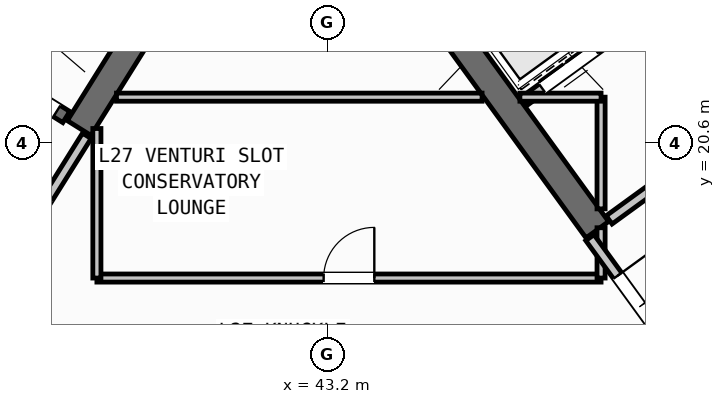
"""IFC4 building model, lengths in metres.
Left out: names, types, materials, properties, quantities, classifications, styles, units other than length and angle.
Written with IfcOpenShell. Run it as: python <this file> out.ifc"""

import sys

from ifc_helpers import new_model, si_unit, direction, frame, frame_2d, origin, place, context, subcontext, project, spatial, rectangle, extrude, source, transform, mapped, element, fill, save


model = new_model("IFC4")
c1 = context("Model", 3, precision=1e-05, world=origin(), true_north=direction((0.0, 1.0)))
c2 = subcontext(c1, "Body", "Model", "MODEL_VIEW")
j1 = project(units=[si_unit("LENGTHUNIT", "METRE"), si_unit("PLANEANGLEUNIT", "RADIAN")], contexts=[c1])
p1 = place(None, origin())
s1 = spatial("IfcSite", under=j1, at=p1, CompositionType="ELEMENT")
p2 = place(p1, origin())
s2 = spatial("IfcBuilding", under=s1, at=p2, CompositionType="ELEMENT")
p3 = place(p2, frame((0.0, 0.0, 108.9)))
s3 = spatial("IfcBuildingStorey", under=s2, at=p3, CompositionType="ELEMENT", Elevation=108.9)
p4 = place(p3, frame((40.194, 23.922, 0.0), z_axis=(0.0, 0.0, 1.0), x_axis=(-0.529888438328, -0.848067357541, 0.0)))
e1 = element("IfcWall", 1, at=p4, inside=s3, PredefinedType="SHEAR", context=c2, shape_type="SweptSolid", body=[
    extrude(rectangle(XDim=3.575, YDim=0.55, at=frame_2d((1.788, 0.0))), origin(), (0.0, 0.0, 1.0), 3.35),
])
p5 = place(p3, frame((48.526, 18.884, 0.0), z_axis=(0.0, 0.0, 1.0), x_axis=(-0.587764933797, 0.809031756236, 0.0)))
e2 = element("IfcWall", 2, at=p5, inside=s3, PredefinedType="SHEAR", context=c2, shape_type="SweptSolid", body=[
    extrude(rectangle(XDim=6.425, YDim=0.55, at=frame_2d((3.212, 0.0))), origin(), (0.0, 0.0, 1.0), 3.35),
])
p6 = place(p3, frame((38.046, 21.108, 0.0), z_axis=(0.0, 0.0, 1.0), x_axis=(-0.848054434086, 0.529909121291, 0.0)))
e3 = element("IfcWall", 3, at=p6, inside=s3, PredefinedType="SHEAR", context=c2, shape_type="SweptSolid", body=[
    extrude(rectangle(XDim=7.33, YDim=0.26, at=frame_2d((3.665, 0.0))), origin(), (0.0, 0.0, 1.0), 3.35),
])
p7 = place(p6, frame((0.22, 0.0, 0.0)))
e4 = element("IfcOpeningElement", 4, at=p7, cuts=e3, PredefinedType="OPENING", context=c2, shape_type="SweptSolid", body=[
    extrude(rectangle(XDim=1.1, YDim=2.1, at=frame_2d((0.55, 1.05))), frame((0.0, 0.14, 0.0), z_axis=(0.0, -1.0, 0.0), x_axis=(1.0, 0.0, 0.0)), (0.0, 0.0, 1.0), 0.28),
])
p8 = place(p3, frame((47.065, 21.407, 0.0), z_axis=(0.0, 0.0, 1.0), x_axis=(0.809032984992, 0.587763242466, 0.0)))
e5 = element("IfcWall", 5, at=p8, inside=s3, PredefinedType="STANDARD", context=c2, shape_type="SweptSolid", body=[
    extrude(rectangle(XDim=3.448, YDim=0.2, at=frame_2d((1.724, 0.0))), origin(), (0.0, 0.0, 1.0), 3.34),
])
p9 = place(p8, frame((0.458, 0.0, 0.0)))
e6 = element("IfcOpeningElement", 6, at=p9, cuts=e5, PredefinedType="OPENING", context=c2, shape_type="SweptSolid", body=[
    extrude(rectangle(XDim=1.3, YDim=2.2, at=frame_2d((0.65, 1.1))), frame((0.0, 0.11, 0.0), z_axis=(0.0, -1.0, 0.0), x_axis=(1.0, 0.0, 0.0)), (0.0, 0.0, 1.0), 0.22),
])
p10 = place(p3, frame((48.758, 19.077, 0.0), z_axis=(0.0, 0.0, 1.0), x_axis=(0.809005065155, 0.587801671104, 0.0)))
e7 = element("IfcWall", 7, at=p10, inside=s3, PredefinedType="STANDARD", context=c2, shape_type="SweptSolid", body=[
    extrude(rectangle(XDim=5.768, YDim=0.2, at=frame_2d((2.884, 0.0))), origin(), (0.0, 0.0, 1.0), 3.34),
])
p11 = place(p10, frame((2.548, 0.0, 0.0)))
e8 = element("IfcOpeningElement", 8, at=p11, cuts=e7, PredefinedType="OPENING", context=c2, shape_type="SweptSolid", body=[
    extrude(rectangle(XDim=1.15, YDim=2.1, at=frame_2d((0.575, 1.05))), frame((0.0, 0.11, 0.0), z_axis=(0.0, -1.0, 0.0), x_axis=(1.0, 0.0, 0.0)), (0.0, 0.0, 1.0), 0.22),
])
p12 = place(p3, frame((38.451, 20.737, 0.0), z_axis=(0.0, 0.0, 1.0), x_axis=(-0.529924799939, -0.848044637038, 0.0)))
e9 = element("IfcWall", 9, at=p12, inside=s3, PredefinedType="STANDARD", context=c2, shape_type="SweptSolid", body=[
    extrude(rectangle(XDim=2.96, YDim=0.2, at=frame_2d((1.48, 0.0))), origin(), (0.0, 0.0, 1.0), 3.34),
])
p13 = place(p12, frame((1.46, 0.0, 0.0)))
e10 = element("IfcOpeningElement", 10, at=p13, cuts=e9, PredefinedType="OPENING", context=c2, shape_type="SweptSolid", body=[
    extrude(rectangle(XDim=0.86, YDim=2.05, at=frame_2d((0.43, 1.025))), frame((0.0, 0.11, 0.0), z_axis=(0.0, -1.0, 0.0), x_axis=(1.0, 0.0, 0.0)), (0.0, 0.0, 1.0), 0.22),
])
p14 = place(p3, frame((38.65, 17.93, 0.0), z_axis=(0.0, 0.0, 1.0), x_axis=(1.0, 0.0, 0.0)))
e11 = element("IfcWall", 11, at=p14, inside=s3, PredefinedType="PARTITIONING", context=c2, shape_type="SweptSolid", body=[
    extrude(rectangle(XDim=9.95, YDim=0.16, at=frame_2d((4.975, 0.0))), origin(), (0.0, 0.0, 1.0), 3.34),
])
p15 = place(p14, frame((4.475, 0.0, 0.0)))
e12 = element("IfcOpeningElement", 12, at=p15, cuts=e11, PredefinedType="OPENING", context=c2, shape_type="SweptSolid", body=[
    extrude(rectangle(XDim=1.0, YDim=2.1, at=frame_2d((0.5, 1.05))), frame((0.0, 0.09, 0.0), z_axis=(0.0, -1.0, 0.0), x_axis=(1.0, 0.0, 0.0)), (0.0, 0.0, 1.0), 0.18),
])
p16 = place(p3, frame((38.65, 17.93, 0.0), z_axis=(0.0, 0.0, 1.0), x_axis=(0.0, 1.0, 0.0)))
e13 = element("IfcWall", 13, at=p16, inside=s3, PredefinedType="PARTITIONING", context=c2, shape_type="SweptSolid", body=[
    extrude(rectangle(XDim=2.951, YDim=0.16, at=frame_2d((1.476, 0.0))), origin(), (0.0, 0.0, 1.0), 3.34),
])
p17 = place(p3, frame((48.6, 17.93, 0.0), z_axis=(0.0, 0.0, 1.0), x_axis=(0.0, 1.0, 0.0)))
e14 = element("IfcWall", 14, at=p17, inside=s3, PredefinedType="PARTITIONING", context=c2, shape_type="SweptSolid", body=[
    extrude(rectangle(XDim=0.993, YDim=0.16, at=frame_2d((0.496, 0.0))), origin(), (0.0, 0.0, 1.0), 3.34),
])
p18 = place(p3, frame((48.6, 19.295, 0.0), z_axis=(0.0, 0.0, 1.0), x_axis=(0.0, 1.0, 0.0)))
e15 = element("IfcWall", 15, at=p18, inside=s3, PredefinedType="PARTITIONING", context=c2, shape_type="SweptSolid", body=[
    extrude(rectangle(XDim=2.205, YDim=0.16, at=frame_2d((1.103, 0.0))), origin(), (0.0, 0.0, 1.0), 3.34),
])
p19 = place(p3, frame((39.037, 21.5, 0.0), z_axis=(0.0, 0.0, 1.0), x_axis=(1.0, 0.0, 0.0)))
e16 = element("IfcWall", 16, at=p19, inside=s3, PredefinedType="PARTITIONING", context=c2, shape_type="SweptSolid", body=[
    extrude(rectangle(XDim=7.215, YDim=0.16, at=frame_2d((3.607, 0.0))), origin(), (0.0, 0.0, 1.0), 3.34),
])
p20 = place(p3, frame((46.998, 21.5, 0.0), z_axis=(0.0, 0.0, 1.0), x_axis=(1.0, 0.0, 0.0)))
e17 = element("IfcWall", 17, at=p20, inside=s3, PredefinedType="PARTITIONING", context=c2, shape_type="SweptSolid", body=[
    extrude(rectangle(XDim=1.602, YDim=0.16, at=frame_2d((0.801, 0.0))), origin(), (0.0, 0.0, 1.0), 3.34),
])
p21 = place(p3, frame((50.119, 16.333, 0.0), z_axis=(0.0, 0.0, 1.0), x_axis=(-0.587749856981, 0.809042709391, 0.0)))
e18 = element("IfcWall", 18, at=p21, inside=s3, PredefinedType="STANDARD", context=c2, shape_type="SweptSolid", body=[
    extrude(rectangle(XDim=2.96, YDim=0.2, at=frame_2d((1.48, 0.0))), origin(), (0.0, 0.0, 1.0), 3.34),
])
p22 = place(p21, frame((0.53, 0.0, 0.0)))
e19 = element("IfcOpeningElement", 19, at=p22, cuts=e18, PredefinedType="OPENING", context=c2, shape_type="SweptSolid", body=[
    extrude(rectangle(XDim=1.5, YDim=2.15, at=frame_2d((0.75, 1.075))), frame((0.0, 0.11, 0.0), z_axis=(0.0, -1.0, 0.0), x_axis=(1.0, 0.0, 0.0)), (0.0, 0.0, 1.0), 0.22),
])
m1 = source(origin(), c2, "Body", "SweptSolid", [
    extrude(rectangle(XDim=1.1, YDim=2.1, at=frame_2d((0.55, 1.05))), frame((0.0, 0.025, 0.0), z_axis=(0.0, -1.0, 0.0), x_axis=(1.0, 0.0, 0.0)), (0.0, 0.0, 1.0), 0.05),
])
p23 = place(p7, origin())
e20 = element("IfcDoor", 20, at=p23, inside=s3, OperationType="SINGLE_SWING_RIGHT", PredefinedType="DOOR", context=c2, shape_type="MappedRepresentation", body=[
    mapped(m1, transform((0.0, 0.0, 0.0), scale=1.0)),
])
fill(e4, e20)
m2 = source(origin(), c2, "Body", "SweptSolid", [
    extrude(rectangle(XDim=1.3, YDim=2.2, at=frame_2d((0.65, 1.1))), frame((0.0, 0.025, 0.0), z_axis=(0.0, -1.0, 0.0), x_axis=(1.0, 0.0, 0.0)), (0.0, 0.0, 1.0), 0.05),
])
p24 = place(p9, origin())
e21 = element("IfcDoor", 21, at=p24, inside=s3, OperationType="DOUBLE_DOOR_SLIDING", PredefinedType="DOOR", context=c2, shape_type="MappedRepresentation", body=[
    mapped(m2, transform((0.0, 0.0, 0.0), scale=1.0)),
])
fill(e6, e21)
m3 = source(origin(), c2, "Body", "SweptSolid", [
    extrude(rectangle(XDim=1.0, YDim=2.1, at=frame_2d((0.5, 1.05))), frame((0.0, 0.025, 0.0), z_axis=(0.0, -1.0, 0.0), x_axis=(1.0, 0.0, 0.0)), (0.0, 0.0, 1.0), 0.05),
])
p25 = place(p15, origin())
e22 = element("IfcDoor", 22, at=p25, inside=s3, OperationType="SINGLE_SWING_RIGHT", PredefinedType="DOOR", context=c2, shape_type="MappedRepresentation", body=[
    mapped(m3, transform((0.0, 0.0, 0.0), scale=1.0)),
])
fill(e12, e22)
m4 = source(origin(), c2, "Body", "SweptSolid", [
    extrude(rectangle(XDim=1.5, YDim=2.15, at=frame_2d((0.75, 1.075))), frame((0.0, 0.025, 0.0), z_axis=(0.0, -1.0, 0.0), x_axis=(1.0, 0.0, 0.0)), (0.0, 0.0, 1.0), 0.05),
])
p26 = place(p22, frame((1.5, 0.0, 0.0), z_axis=(0.0, 0.0, 1.0), x_axis=(-1.0, 0.0, 0.0)))
e23 = element("IfcDoor", 23, at=p26, inside=s3, OperationType="DOUBLE_DOOR_SINGLE_SWING", PredefinedType="DOOR", context=c2, shape_type="MappedRepresentation", body=[
    mapped(m4, transform((0.0, 0.0, 0.0), scale=1.0)),
])
fill(e19, e23)
save(model, sys.argv[1])
